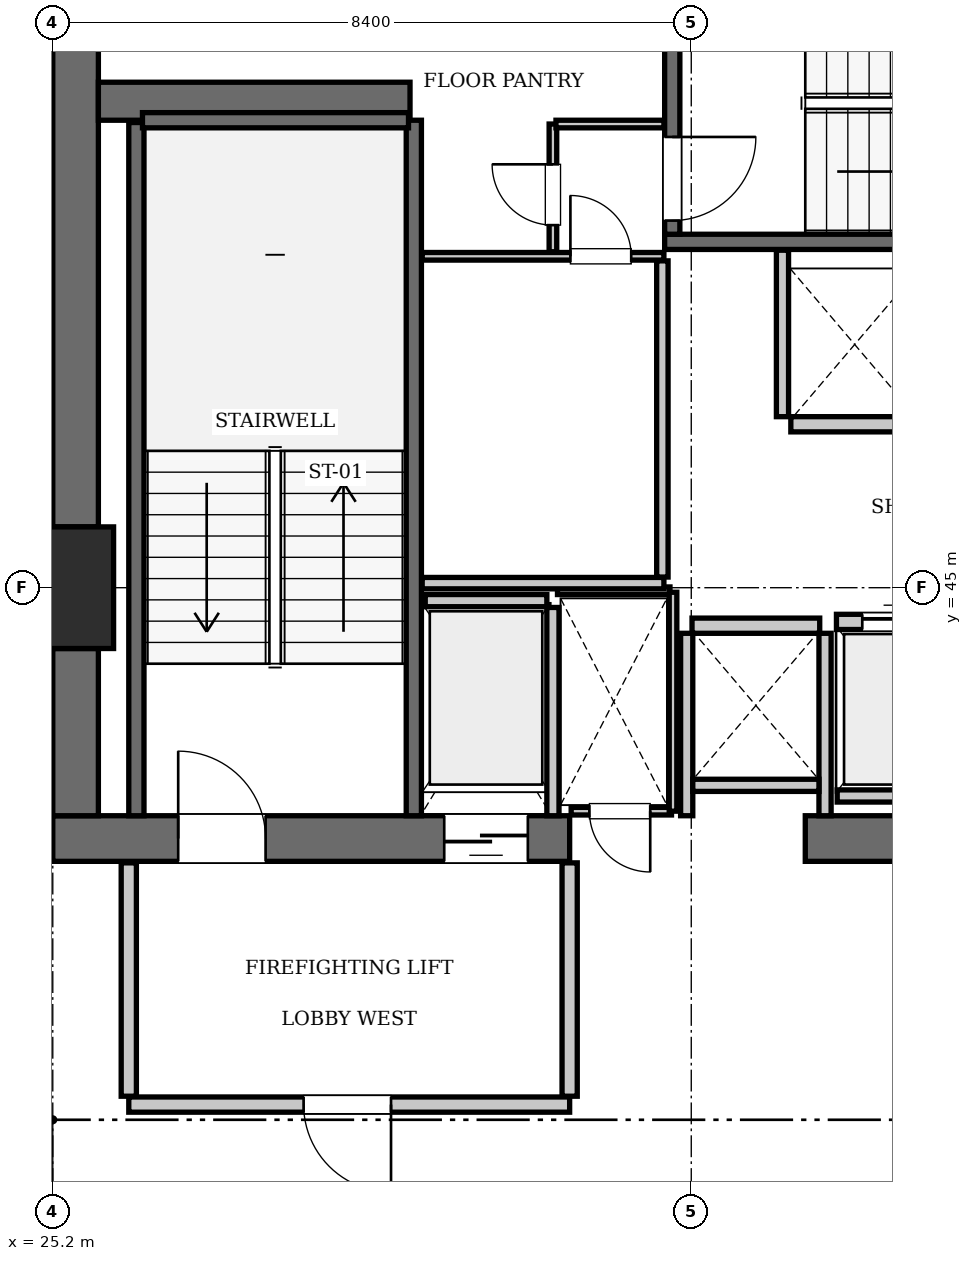
"""IFC4 building model, lengths in metres.
Left out: names, types, materials, properties, quantities, classifications, styles, units other than length and angle.
Written with IfcOpenShell. Run it as: python <this file> out.ifc"""

import sys

from ifc_helpers import new_model, si_unit, direction, frame, frame_2d, origin, origin_2d, place, context, subcontext, project, spatial, rectangle, extrude, element, fill, save


model = new_model("IFC4")
c1 = context("Model", 3, precision=1e-05, world=origin(), true_north=direction((0.0, 1.0)))
c2 = subcontext(c1, "Body", "Model", "MODEL_VIEW")
j1 = project(units=[si_unit("LENGTHUNIT", "METRE"), si_unit("PLANEANGLEUNIT", "RADIAN")], contexts=[c1])
p1 = place(None, origin())
s1 = spatial("IfcSite", under=j1, at=p1, CompositionType="ELEMENT")
p2 = place(p1, origin())
s2 = spatial("IfcBuilding", under=s1, at=p2, CompositionType="ELEMENT")
p3 = place(p2, frame((0.0, 0.0, 250.95)))
s3 = spatial("IfcBuildingStorey", under=s2, at=p3, CompositionType="ELEMENT", Elevation=250.95)
p4 = place(p3, frame((25.2, 45.0, 0.0), z_axis=(0.0, 0.0, 1.0), x_axis=(1.0, 0.0, 0.0)))
e1 = element("IfcColumn", 1, at=p4, inside=s3, PredefinedType="COLUMN", context=c2, shape_type="SweptSolid", body=[
    extrude(rectangle(XDim=1.6, YDim=1.6, at=origin_2d()), origin(), (0.0, 0.0, 1.0), 3.85),
])
p5 = place(p3, frame((25.2, 41.7, 0.0), z_axis=(0.0, 0.0, 1.0), x_axis=(1.0, 0.0, 0.0)))
e2 = element("IfcWall", 2, at=p5, inside=s3, PredefinedType="SHEAR", context=c2, shape_type="SweptSolid", body=[
    extrude(rectangle(XDim=6.8, YDim=0.6, at=frame_2d((3.4, 0.0))), origin(), (0.0, 0.0, 1.0), 3.85),
])
p6 = place(p5, frame((1.65, 0.0, 0.0)))
e3 = element("IfcOpeningElement", 3, at=p6, cuts=e2, PredefinedType="OPENING", context=c2, shape_type="SweptSolid", body=[
    extrude(rectangle(XDim=1.15, YDim=2.15, at=frame_2d((0.575, 1.075))), frame((0.0, 0.31, 0.0), z_axis=(0.0, -1.0, 0.0), x_axis=(1.0, 0.0, 0.0)), (0.0, 0.0, 1.0), 0.62),
])
p7 = place(p5, frame((5.15, 0.0, 0.0)))
e4 = element("IfcOpeningElement", 4, at=p7, cuts=e2, PredefinedType="OPENING", context=c2, shape_type="SweptSolid", body=[
    extrude(rectangle(XDim=1.1, YDim=2.2, at=frame_2d((0.55, 1.1))), frame((0.0, 0.31, 0.0), z_axis=(0.0, -1.0, 0.0), x_axis=(1.0, 0.0, 0.0)), (0.0, 0.0, 1.0), 0.62),
])
p8 = place(p3, frame((35.1, 41.7, 0.0), z_axis=(0.0, 0.0, 1.0), x_axis=(1.0, 0.0, 0.0)))
e5 = element("IfcWall", 5, at=p8, inside=s3, PredefinedType="SHEAR", context=c2, shape_type="SweptSolid", body=[
    extrude(rectangle(XDim=5.4, YDim=0.6, at=frame_2d((2.7, 0.0))), origin(), (0.0, 0.0, 1.0), 3.85),
])
p9 = place(p3, frame((25.5, 42.0, 0.0), z_axis=(0.0, 0.0, 1.0), x_axis=(0.0, 1.0, 0.0)))
e6 = element("IfcWall", 6, at=p9, inside=s3, PredefinedType="SHEAR", context=c2, shape_type="SweptSolid", body=[
    extrude(rectangle(XDim=2.2, YDim=0.6, at=frame_2d((1.1, 0.0))), origin(), (0.0, 0.0, 1.0), 3.85),
])
p10 = place(p3, frame((25.5, 45.8, 0.0), z_axis=(0.0, 0.0, 1.0), x_axis=(0.0, 1.0, 0.0)))
e7 = element("IfcWall", 7, at=p10, inside=s3, PredefinedType="SHEAR", context=c2, shape_type="SweptSolid", body=[
    extrude(rectangle(XDim=7.6, YDim=0.6, at=frame_2d((3.8, 0.0))), origin(), (0.0, 0.0, 1.0), 3.85),
])
p11 = place(p3, frame((25.8, 51.4, 0.0), z_axis=(0.0, 0.0, 1.0), x_axis=(1.0, 0.0, 0.0)))
e8 = element("IfcWall", 8, at=p11, inside=s3, PredefinedType="SHEAR", context=c2, shape_type="SweptSolid", body=[
    extrude(rectangle(XDim=4.1, YDim=0.5, at=frame_2d((2.05, 0.0))), origin(), (0.0, 0.0, 1.0), 3.85),
])
p12 = place(p3, frame((29.95, 42.0, 0.0), z_axis=(0.0, 0.0, 1.0), x_axis=(0.0, 1.0, 0.0)))
e9 = element("IfcWall", 9, at=p12, inside=s3, PredefinedType="SOLIDWALL", context=c2, shape_type="SweptSolid", body=[
    extrude(rectangle(XDim=9.15, YDim=0.2, at=frame_2d((4.575, 0.0))), origin(), (0.0, 0.0, 1.0), 3.61),
])
p13 = place(p3, frame((26.3, 42.0, 0.0), z_axis=(0.0, 0.0, 1.0), x_axis=(0.0, 1.0, 0.0)))
e10 = element("IfcWall", 10, at=p13, inside=s3, PredefinedType="SOLIDWALL", context=c2, shape_type="SweptSolid", body=[
    extrude(rectangle(XDim=9.12, YDim=0.2, at=frame_2d((4.56, 0.0))), origin(), (0.0, 0.0, 1.0), 3.61),
])
p14 = place(p3, frame((26.38, 51.15, 0.0), z_axis=(0.0, 0.0, 1.0), x_axis=(1.0, 0.0, 0.0)))
e11 = element("IfcWall", 11, at=p14, inside=s3, PredefinedType="SOLIDWALL", context=c2, shape_type="SweptSolid", body=[
    extrude(rectangle(XDim=3.5, YDim=0.2, at=frame_2d((1.75, 0.0))), origin(), (0.0, 0.0, 1.0), 3.61),
])
p15 = place(p3, frame((33.25, 49.55, 0.0), z_axis=(0.0, 0.0, 1.0), x_axis=(1.0, 0.0, 0.0)))
e12 = element("IfcWall", 12, at=p15, inside=s3, PredefinedType="SOLIDWALL", context=c2, shape_type="SweptSolid", body=[
    extrude(rectangle(XDim=9.1, YDim=0.2, at=frame_2d((4.55, 0.0))), origin(), (0.0, 0.0, 1.0), 3.61),
])
p16 = place(p3, frame((33.35, 49.65, 0.0), z_axis=(0.0, 0.0, 1.0), x_axis=(0.0, 1.0, 0.0)))
e13 = element("IfcWall", 13, at=p16, inside=s3, PredefinedType="SOLIDWALL", context=c2, shape_type="SweptSolid", body=[
    extrude(rectangle(XDim=3.75, YDim=0.2, at=frame_2d((1.875, 0.0))), origin(), (0.0, 0.0, 1.0), 3.61),
])
p17 = place(p16, frame((0.18, 0.0, 0.0)))
e14 = element("IfcOpeningElement", 14, at=p17, cuts=e13, PredefinedType="OPENING", context=c2, shape_type="SweptSolid", body=[
    extrude(rectangle(XDim=1.1, YDim=2.15, at=frame_2d((0.55, 1.075))), frame((0.0, 0.11, 0.0), z_axis=(0.0, -1.0, 0.0), x_axis=(1.0, 0.0, 0.0)), (0.0, 0.0, 1.0), 0.22),
])
p18 = place(p3, frame((35.51, 44.55, 0.0), z_axis=(0.0, 0.0, 1.0), x_axis=(1.0, 0.0, 0.0)))
e15 = element("IfcWall", 15, at=p18, inside=s3, PredefinedType="SOLIDWALL", context=c2, shape_type="SweptSolid", body=[
    extrude(rectangle(XDim=1.68, YDim=0.2, at=frame_2d((0.84, 0.0))), origin(), (0.0, 0.0, 1.0), 3.61),
])
p19 = place(p18, frame((0.34, 0.0, 0.0)))
e16 = element("IfcOpeningElement", 16, at=p19, cuts=e15, PredefinedType="OPENING", context=c2, shape_type="SweptSolid", body=[
    extrude(rectangle(XDim=1.0, YDim=2.15, at=frame_2d((0.5, 1.075))), frame((0.0, 0.11, 0.0), z_axis=(0.0, -1.0, 0.0), x_axis=(1.0, 0.0, 0.0)), (0.0, 0.0, 1.0), 0.22),
])
p20 = place(p3, frame((34.91, 47.15, 0.0), z_axis=(0.0, 0.0, 1.0), x_axis=(1.0, 0.0, 0.0)))
e17 = element("IfcWall", 17, at=p20, inside=s3, PredefinedType="SOLIDWALL", context=c2, shape_type="SweptSolid", body=[
    extrude(rectangle(XDim=1.68, YDim=0.2, at=frame_2d((0.84, 0.0))), origin(), (0.0, 0.0, 1.0), 3.61),
])
p21 = place(p3, frame((33.61, 44.5, 0.0), z_axis=(0.0, 0.0, 1.0), x_axis=(1.0, 0.0, 0.0)))
e18 = element("IfcWall", 18, at=p21, inside=s3, PredefinedType="SOLIDWALL", context=c2, shape_type="SweptSolid", body=[
    extrude(rectangle(XDim=1.68, YDim=0.2, at=frame_2d((0.84, 0.0))), origin(), (0.0, 0.0, 1.0), 3.61),
])
p22 = place(p3, frame((30.1, 44.83, 0.0), z_axis=(0.0, 0.0, 1.0), x_axis=(1.0, 0.0, 0.0)))
e19 = element("IfcWall", 19, at=p22, inside=s3, PredefinedType="SOLIDWALL", context=c2, shape_type="SweptSolid", body=[
    extrude(rectangle(XDim=1.6, YDim=0.16, at=frame_2d((0.8, 0.0))), origin(), (0.0, 0.0, 1.0), 3.61),
])
p23 = place(p3, frame((31.78, 42.0, 0.0), z_axis=(0.0, 0.0, 1.0), x_axis=(0.0, 1.0, 0.0)))
e20 = element("IfcWall", 20, at=p23, inside=s3, PredefinedType="SOLIDWALL", context=c2, shape_type="SweptSolid", body=[
    extrude(rectangle(XDim=2.74, YDim=0.16, at=frame_2d((1.37, 0.0))), origin(), (0.0, 0.0, 1.0), 3.61),
])
p24 = place(p3, frame((35.52, 42.26, 0.0), z_axis=(0.0, 0.0, 1.0), x_axis=(1.0, 0.0, 0.0)))
e21 = element("IfcWall", 21, at=p24, inside=s3, PredefinedType="SOLIDWALL", context=c2, shape_type="SweptSolid", body=[
    extrude(rectangle(XDim=5.02, YDim=0.16, at=frame_2d((2.51, 0.0))), origin(), (0.0, 0.0, 1.0), 3.61),
])
p25 = place(p3, frame((34.8, 47.25, 0.0), z_axis=(0.0, 0.0, 1.0), x_axis=(0.0, 1.0, 0.0)))
e22 = element("IfcWall", 22, at=p25, inside=s3, PredefinedType="SOLIDWALL", context=c2, shape_type="SweptSolid", body=[
    extrude(rectangle(XDim=2.19, YDim=0.16, at=frame_2d((1.095, 0.0))), origin(), (0.0, 0.0, 1.0), 3.61),
])
for number, where, z_axis, x_axis in (
    (23, (33.54, 42.0, 0.0), (0.0, 0.0, 1.0), (0.0, 1.0, 0.0)),
    (24, (35.36, 42.0, 0.0), (0.0, 0.0, 1.0), (0.0, 1.0, 0.0)),
):
    element("IfcWall", number, at=place(p3, frame(where, z_axis=z_axis, x_axis=x_axis)), inside=s3, PredefinedType="SOLIDWALL", context=c2, shape_type="SweptSolid", body=[
        extrude(rectangle(XDim=2.4, YDim=0.16, at=frame_2d((1.2, 0.0))), origin(), (0.0, 0.0, 1.0), 3.61),
    ])
p26 = place(p3, frame((33.62, 42.4, 0.0), z_axis=(0.0, 0.0, 1.0), x_axis=(1.0, 0.0, 0.0)))
e25 = element("IfcWall", 25, at=p26, inside=s3, PredefinedType="SOLIDWALL", context=c2, shape_type="SweptSolid", body=[
    extrude(rectangle(XDim=1.66, YDim=0.16, at=frame_2d((0.83, 0.0))), origin(), (0.0, 0.0, 1.0), 3.61),
])
p27 = place(p3, frame((26.2, 38.2, 0.0), z_axis=(0.0, 0.0, 1.0), x_axis=(1.0, 0.0, 0.0)))
e26 = element("IfcWall", 26, at=p27, inside=s3, PredefinedType="PARTITIONING", context=c2, shape_type="SweptSolid", body=[
    extrude(rectangle(XDim=5.8, YDim=0.2, at=frame_2d((2.9, 0.0))), origin(), (0.0, 0.0, 1.0), 3.61),
])
p28 = place(p27, frame((2.3, 0.0, 0.0)))
e27 = element("IfcOpeningElement", 27, at=p28, cuts=e26, PredefinedType="OPENING", context=c2, shape_type="SweptSolid", body=[
    extrude(rectangle(XDim=1.15, YDim=2.15, at=frame_2d((0.575, 1.075))), frame((0.0, 0.11, 0.0), z_axis=(0.0, -1.0, 0.0), x_axis=(1.0, 0.0, 0.0)), (0.0, 0.0, 1.0), 0.22),
])
for number, where, z_axis, x_axis in (
    (28, (26.2, 38.31, 0.0), (0.0, 0.0, 1.0), (0.0, 1.0, 0.0)),
    (29, (32.0, 38.31, 0.0), (0.0, 0.0, 1.0), (0.0, 1.0, 0.0)),
):
    element("IfcWall", number, at=place(p3, frame(where, z_axis=z_axis, x_axis=x_axis)), inside=s3, PredefinedType="PARTITIONING", context=c2, shape_type="SweptSolid", body=[
        extrude(rectangle(XDim=3.07, YDim=0.2, at=frame_2d((1.535, 0.0))), origin(), (0.0, 0.0, 1.0), 3.61),
    ])
p29 = place(p3, frame((32.02, 42.06, 0.0), z_axis=(0.0, 0.0, 1.0), x_axis=(1.0, 0.0, 0.0)))
e30 = element("IfcWall", 30, at=p29, inside=s3, PredefinedType="PARTITIONING", context=c2, shape_type="SweptSolid", body=[
    extrude(rectangle(XDim=1.32, YDim=0.1, at=frame_2d((0.66, 0.0))), origin(), (0.0, 0.0, 1.0), 3.61),
])
p30 = place(p29, frame((0.24, 0.0, 0.0)))
e31 = element("IfcOpeningElement", 31, at=p30, cuts=e30, PredefinedType="OPENING", context=c2, shape_type="SweptSolid", body=[
    extrude(rectangle(XDim=0.8, YDim=2.05, at=frame_2d((0.4, 1.025))), frame((0.0, 0.06, 0.0), z_axis=(0.0, -1.0, 0.0), x_axis=(1.0, 0.0, 0.0)), (0.0, 0.0, 1.0), 0.12),
])
p31 = place(p3, frame((31.84, 44.96, 0.0), z_axis=(0.0, 0.0, 1.0), x_axis=(1.0, 0.0, 0.0)))
e32 = element("IfcWall", 32, at=p31, inside=s3, PredefinedType="PARTITIONING", context=c2, shape_type="SweptSolid", body=[
    extrude(rectangle(XDim=1.48, YDim=0.1, at=frame_2d((0.74, 0.0))), origin(), (0.0, 0.0, 1.0), 3.61),
])
p32 = place(p3, frame((33.36, 42.06, 0.0), z_axis=(0.0, 0.0, 1.0), x_axis=(0.0, 1.0, 0.0)))
e33 = element("IfcWall", 33, at=p32, inside=s3, PredefinedType="PARTITIONING", context=c2, shape_type="SweptSolid", body=[
    extrude(rectangle(XDim=2.88, YDim=0.1, at=frame_2d((1.44, 0.0))), origin(), (0.0, 0.0, 1.0), 3.61),
])
p33 = place(p3, frame((30.06, 45.06, 0.0), z_axis=(0.0, 0.0, 1.0), x_axis=(1.0, 0.0, 0.0)))
e34 = element("IfcWall", 34, at=p33, inside=s3, PredefinedType="PARTITIONING", context=c2, shape_type="SweptSolid", body=[
    extrude(rectangle(XDim=3.18, YDim=0.15, at=frame_2d((1.59, 0.0))), origin(), (0.0, 0.0, 1.0), 3.61),
])
p34 = place(p3, frame((33.22, 45.14, 0.0), z_axis=(0.0, 0.0, 1.0), x_axis=(0.0, 1.0, 0.0)))
e35 = element("IfcWall", 35, at=p34, inside=s3, PredefinedType="PARTITIONING", context=c2, shape_type="SweptSolid", body=[
    extrude(rectangle(XDim=4.16, YDim=0.15, at=frame_2d((2.08, 0.0))), origin(), (0.0, 0.0, 1.0), 3.61),
])
p35 = place(p3, frame((30.06, 49.36, 0.0), z_axis=(0.0, 0.0, 1.0), x_axis=(1.0, 0.0, 0.0)))
e36 = element("IfcWall", 36, at=p35, inside=s3, PredefinedType="PARTITIONING", context=c2, shape_type="SweptSolid", body=[
    extrude(rectangle(XDim=3.18, YDim=0.1, at=frame_2d((1.59, 0.0))), origin(), (0.0, 0.0, 1.0), 3.61),
])
p36 = place(p35, frame((1.95, 0.0, 0.0)))
e37 = element("IfcOpeningElement", 37, at=p36, cuts=e36, PredefinedType="OPENING", context=c2, shape_type="SweptSolid", body=[
    extrude(rectangle(XDim=0.8, YDim=2.05, at=frame_2d((0.4, 1.025))), frame((0.0, 0.06, 0.0), z_axis=(0.0, -1.0, 0.0), x_axis=(1.0, 0.0, 0.0)), (0.0, 0.0, 1.0), 0.12),
])
p37 = place(p3, frame((31.78, 49.42, 0.0), z_axis=(0.0, 0.0, 1.0), x_axis=(0.0, 1.0, 0.0)))
e38 = element("IfcWall", 38, at=p37, inside=s3, PredefinedType="PARTITIONING", context=c2, shape_type="SweptSolid", body=[
    extrude(rectangle(XDim=1.68, YDim=0.1, at=frame_2d((0.84, 0.0))), origin(), (0.0, 0.0, 1.0), 3.61),
])
p38 = place(p37, frame((0.35, 0.0, 0.0)))
e39 = element("IfcOpeningElement", 39, at=p38, cuts=e38, PredefinedType="OPENING", context=c2, shape_type="SweptSolid", body=[
    extrude(rectangle(XDim=0.8, YDim=2.05, at=frame_2d((0.4, 1.025))), frame((0.0, 0.06, 0.0), z_axis=(0.0, -1.0, 0.0), x_axis=(1.0, 0.0, 0.0)), (0.0, 0.0, 1.0), 0.12),
])
p39 = place(p3, frame((31.82, 51.1, 0.0), z_axis=(0.0, 0.0, 1.0), x_axis=(1.0, 0.0, 0.0)))
e40 = element("IfcWall", 40, at=p39, inside=s3, PredefinedType="PARTITIONING", context=c2, shape_type="SweptSolid", body=[
    extrude(rectangle(XDim=1.42, YDim=0.1, at=frame_2d((0.71, 0.0))), origin(), (0.0, 0.0, 1.0), 3.61),
])
p40 = place(p6, origin())
e41 = element("IfcDoor", 41, at=p40, inside=s3, OperationType="SINGLE_SWING_LEFT", PredefinedType="DOOR", context=c2, shape_type="SweptSolid", body=[
    extrude(rectangle(XDim=1.15, YDim=2.15, at=frame_2d((0.575, 1.075))), frame((0.0, 0.025, 0.0), z_axis=(0.0, -1.0, 0.0), x_axis=(1.0, 0.0, 0.0)), (0.0, 0.0, 1.0), 0.05),
])
fill(e3, e41)
p41 = place(p17, frame((1.1, 0.0, 0.0), z_axis=(0.0, 0.0, 1.0), x_axis=(-1.0, 0.0, 0.0)))
e42 = element("IfcDoor", 42, at=p41, inside=s3, OperationType="SINGLE_SWING_LEFT", PredefinedType="DOOR", context=c2, shape_type="SweptSolid", body=[
    extrude(rectangle(XDim=1.1, YDim=2.15, at=frame_2d((0.55, 1.075))), frame((0.0, 0.025, 0.0), z_axis=(0.0, -1.0, 0.0), x_axis=(1.0, 0.0, 0.0)), (0.0, 0.0, 1.0), 0.05),
])
fill(e14, e42)
p42 = place(p19, origin())
e43 = element("IfcDoor", 43, at=p42, inside=s3, OperationType="SLIDING_TO_LEFT", PredefinedType="DOOR", context=c2, shape_type="SweptSolid", body=[
    extrude(rectangle(XDim=1.0, YDim=2.15, at=frame_2d((0.5, 1.075))), frame((0.0, 0.025, 0.0), z_axis=(0.0, -1.0, 0.0), x_axis=(1.0, 0.0, 0.0)), (0.0, 0.0, 1.0), 0.05),
])
fill(e16, e43)
p43 = place(p7, frame((1.1, 0.0, 0.0), z_axis=(0.0, 0.0, 1.0), x_axis=(-1.0, 0.0, 0.0)))
e44 = element("IfcDoor", 44, at=p43, inside=s3, OperationType="SLIDING_TO_LEFT", PredefinedType="DOOR", context=c2, shape_type="SweptSolid", body=[
    extrude(rectangle(XDim=1.1, YDim=2.2, at=frame_2d((0.55, 1.1))), frame((0.0, 0.025, 0.0), z_axis=(0.0, -1.0, 0.0), x_axis=(1.0, 0.0, 0.0)), (0.0, 0.0, 1.0), 0.05),
])
fill(e4, e44)
p44 = place(p28, frame((1.15, 0.0, 0.0), z_axis=(0.0, 0.0, 1.0), x_axis=(-1.0, 0.0, 0.0)))
e45 = element("IfcDoor", 45, at=p44, inside=s3, OperationType="SINGLE_SWING_LEFT", PredefinedType="DOOR", context=c2, shape_type="SweptSolid", body=[
    extrude(rectangle(XDim=1.15, YDim=2.15, at=frame_2d((0.575, 1.075))), frame((0.0, 0.025, 0.0), z_axis=(0.0, -1.0, 0.0), x_axis=(1.0, 0.0, 0.0)), (0.0, 0.0, 1.0), 0.05),
])
fill(e27, e45)
p45 = place(p30, frame((0.8, 0.0, 0.0), z_axis=(0.0, 0.0, 1.0), x_axis=(-1.0, 0.0, 0.0)))
e46 = element("IfcDoor", 46, at=p45, inside=s3, OperationType="SINGLE_SWING_LEFT", PredefinedType="DOOR", context=c2, shape_type="SweptSolid", body=[
    extrude(rectangle(XDim=0.8, YDim=2.05, at=frame_2d((0.4, 1.025))), frame((0.0, 0.025, 0.0), z_axis=(0.0, -1.0, 0.0), x_axis=(1.0, 0.0, 0.0)), (0.0, 0.0, 1.0), 0.05),
])
fill(e31, e46)
p46 = place(p36, origin())
e47 = element("IfcDoor", 47, at=p46, inside=s3, OperationType="SINGLE_SWING_LEFT", PredefinedType="DOOR", context=c2, shape_type="SweptSolid", body=[
    extrude(rectangle(XDim=0.8, YDim=2.05, at=frame_2d((0.4, 1.025))), frame((0.0, 0.025, 0.0), z_axis=(0.0, -1.0, 0.0), x_axis=(1.0, 0.0, 0.0)), (0.0, 0.0, 1.0), 0.05),
])
fill(e37, e47)
p47 = place(p38, origin())
e48 = element("IfcDoor", 48, at=p47, inside=s3, OperationType="SINGLE_SWING_RIGHT", PredefinedType="DOOR", context=c2, shape_type="SweptSolid", body=[
    extrude(rectangle(XDim=0.8, YDim=2.05, at=frame_2d((0.4, 1.025))), frame((0.0, 0.025, 0.0), z_axis=(0.0, -1.0, 0.0), x_axis=(1.0, 0.0, 0.0)), (0.0, 0.0, 1.0), 0.05),
])
fill(e39, e48)
save(model, sys.argv[1])
